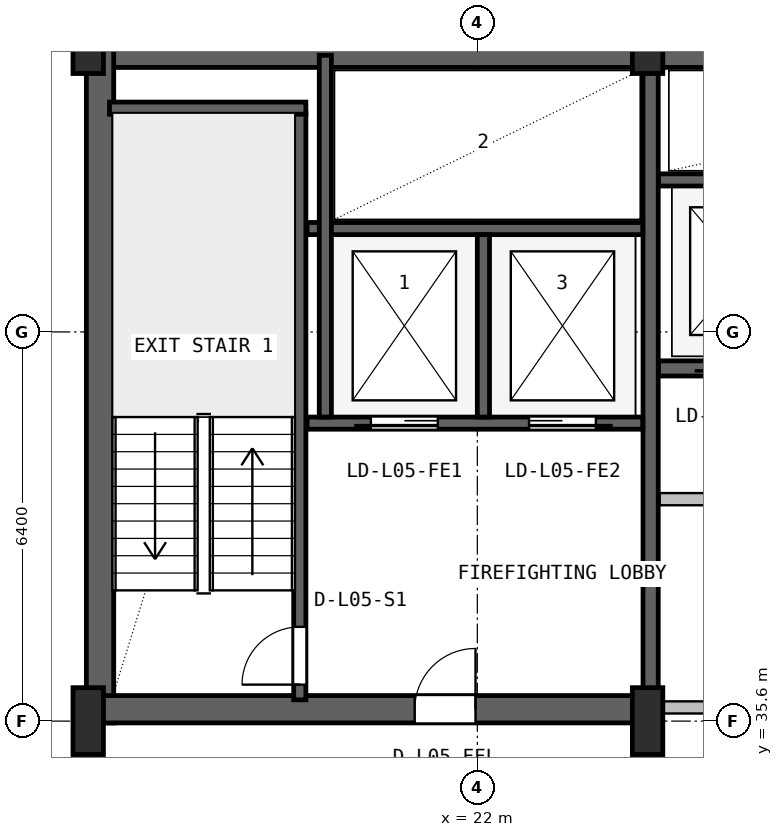
"""IFC4 building model, lengths in metres.
Left out: names, types, materials, properties, quantities, classifications, styles, units other than length and angle.
Written with IfcOpenShell. Run it as: python <this file> out.ifc"""

import sys

from ifc_helpers import new_model, si_unit, direction, frame, frame_2d, origin, origin_2d, place, context, subcontext, project, spatial, rectangle, i_section, extrude, source, transform, mapped, element, fill, save


model = new_model("IFC4")
c1 = context("Model", 3, precision=1e-05, world=origin(), true_north=direction((0.0, 1.0)))
c2 = subcontext(c1, "Body", "Model", "MODEL_VIEW")
j1 = project(units=[si_unit("LENGTHUNIT", "METRE"), si_unit("PLANEANGLEUNIT", "RADIAN")], contexts=[c1])
p1 = place(None, origin())
s1 = spatial("IfcSite", under=j1, at=p1, CompositionType="ELEMENT")
p2 = place(p1, origin())
s2 = spatial("IfcBuilding", under=s1, at=p2, CompositionType="ELEMENT")
p3 = place(p2, frame((0.0, 0.0, 27.6)))
s3 = spatial("IfcBuildingStorey", under=s2, at=p3, CompositionType="ELEMENT", Elevation=27.6)
p4 = place(p3, frame((15.6, 46.575, 0.0), z_axis=(0.0, 0.0, 1.0), x_axis=(1.0, 0.0, 0.0)))
e1 = element("IfcWall", 1, at=p4, inside=s3, PredefinedType="SHEAR", context=c2, shape_type="SweptSolid", body=[
    extrude(rectangle(XDim=36.8, YDim=0.45, at=frame_2d((18.4, 0.0))), origin(), (0.0, 0.0, 1.0), 3.65),
])
p5 = place(p3, frame((15.795, 35.57, 0.0), z_axis=(0.0, 0.0, 1.0), x_axis=(0.0, 1.0, 0.0)))
e2 = element("IfcWall", 2, at=p5, inside=s3, PredefinedType="SHEAR", context=c2, shape_type="SweptSolid", body=[
    extrude(rectangle(XDim=11.23, YDim=0.45, at=frame_2d((5.615, 0.0))), origin(), (0.0, 0.0, 1.0), 3.65),
])
p6 = place(p3, frame((15.57, 35.795, 0.0), z_axis=(0.0, 0.0, 1.0), x_axis=(1.0, 0.0, 0.0)))
e3 = element("IfcWall", 3, at=p6, inside=s3, PredefinedType="SHEAR", context=c2, shape_type="SweptSolid", body=[
    extrude(rectangle(XDim=9.23, YDim=0.45, at=frame_2d((4.615, 0.0))), origin(), (0.0, 0.0, 1.0), 3.65),
])
p7 = place(p6, frame((5.4, 0.0, 0.0)))
e4 = element("IfcOpeningElement", 4, at=p7, cuts=e3, PredefinedType="OPENING", context=c2, shape_type="SweptSolid", body=[
    extrude(rectangle(XDim=1.0, YDim=2.1, at=frame_2d((0.5, 1.05))), frame((0.0, 0.235, 0.0), z_axis=(0.0, -1.0, 0.0), x_axis=(1.0, 0.0, 0.0)), (0.0, 0.0, 1.0), 0.47),
])
m1 = source(origin(), c2, "Body", "SweptSolid", [
    extrude(i_section(OverallWidth=0.5, OverallDepth=1.1, WebThickness=0.018, FlangeThickness=0.032, FilletRadius=0.018, at=origin_2d()), origin(), (0.0, 0.0, 1.0), 3.9),
])
for number, where, z_axis, x_axis in (
    (5, (15.6, 35.6, 0.0), (0.0, 0.0, 1.0), (1.0, 0.0, 0.0)),
    (6, (15.6, 46.8, 0.0), (0.0, 0.0, 1.0), (1.0, 0.0, 0.0)),
    (7, (24.8, 35.6, 0.0), (0.0, 0.0, 1.0), (1.0, 0.0, 0.0)),
    (8, (24.8, 46.8, 0.0), (0.0, 0.0, 1.0), (1.0, 0.0, 0.0)),
):
    element("IfcColumn", number, at=place(p3, frame(where, z_axis=z_axis, x_axis=x_axis)), inside=s3, PredefinedType="COLUMN", context=c2, shape_type="MappedRepresentation", body=[
        mapped(m1, transform((0.0, 0.0, 0.0), x_axis=(1.0, 0.0, 0.0), y_axis=(0.0, 1.0, 0.0), z_axis=(0.0, 0.0, 1.0), scale=1.0)),
    ])
p8 = place(p3, frame((19.08, 35.95, 0.0), z_axis=(0.0, 0.0, 1.0), x_axis=(0.0, 1.0, 0.0)))
e9 = element("IfcWall", 9, at=p8, inside=s3, PredefinedType="SHEAR", context=c2, shape_type="SweptSolid", body=[
    extrude(rectangle(XDim=9.65, YDim=0.2, at=frame_2d((4.825, 0.0))), origin(), (0.0, 0.0, 1.0), 3.65),
])
p9 = place(p8, frame((0.25, 0.0, 0.0)))
e10 = element("IfcOpeningElement", 10, at=p9, cuts=e9, PredefinedType="OPENING", context=c2, shape_type="SweptSolid", body=[
    extrude(rectangle(XDim=0.95, YDim=2.1, at=frame_2d((0.475, 1.05))), frame((0.0, 0.11, 0.0), z_axis=(0.0, -1.0, 0.0), x_axis=(1.0, 0.0, 0.0)), (0.0, 0.0, 1.0), 0.22),
])
p10 = place(p3, frame((15.95, 45.68, 0.0), z_axis=(0.0, 0.0, 1.0), x_axis=(1.0, 0.0, 0.0)))
e11 = element("IfcWall", 11, at=p10, inside=s3, PredefinedType="SHEAR", context=c2, shape_type="SweptSolid", body=[
    extrude(rectangle(XDim=3.23, YDim=0.2, at=frame_2d((1.615, 0.0))), origin(), (0.0, 0.0, 1.0), 3.65),
])
p11 = place(p3, frame((24.85, 36.05, 0.0), z_axis=(0.0, 0.0, 1.0), x_axis=(0.0, 1.0, 0.0)))
e12 = element("IfcWall", 12, at=p11, inside=s3, PredefinedType="SHEAR", context=c2, shape_type="SweptSolid", body=[
    extrude(rectangle(XDim=10.45, YDim=0.25, at=frame_2d((5.225, 0.0))), origin(), (0.0, 0.0, 1.0), 3.65),
])
p12 = place(p3, frame((19.2, 40.5, 0.0), z_axis=(0.0, 0.0, 1.0), x_axis=(1.0, 0.0, 0.0)))
e13 = element("IfcWall", 13, at=p12, inside=s3, PredefinedType="SHEAR", context=c2, shape_type="SweptSolid", body=[
    extrude(rectangle(XDim=5.52, YDim=0.2, at=frame_2d((2.76, 0.0))), origin(), (0.0, 0.0, 1.0), 3.65),
])
p13 = place(p12, frame((1.05, 0.0, 0.0)))
e14 = element("IfcOpeningElement", 14, at=p13, cuts=e13, PredefinedType="OPENING", context=c2, shape_type="SweptSolid", body=[
    extrude(rectangle(XDim=1.1, YDim=2.18, at=frame_2d((0.55, 1.09))), frame((0.0, 0.11, 0.0), z_axis=(0.0, -1.0, 0.0), x_axis=(1.0, 0.0, 0.0)), (0.0, 0.0, 1.0), 0.22),
])
p14 = place(p12, frame((3.65, 0.0, 0.0)))
e15 = element("IfcOpeningElement", 15, at=p14, cuts=e13, PredefinedType="OPENING", context=c2, shape_type="SweptSolid", body=[
    extrude(rectangle(XDim=1.1, YDim=2.18, at=frame_2d((0.55, 1.09))), frame((0.0, 0.11, 0.0), z_axis=(0.0, -1.0, 0.0), x_axis=(1.0, 0.0, 0.0)), (0.0, 0.0, 1.0), 0.22),
])
p15 = place(p3, frame((19.2, 43.7, 0.0), z_axis=(0.0, 0.0, 1.0), x_axis=(1.0, 0.0, 0.0)))
e16 = element("IfcWall", 16, at=p15, inside=s3, PredefinedType="SHEAR", context=c2, shape_type="SweptSolid", body=[
    extrude(rectangle(XDim=5.52, YDim=0.2, at=frame_2d((2.76, 0.0))), origin(), (0.0, 0.0, 1.0), 3.65),
])
p16 = place(p3, frame((22.1, 40.6, 0.0), z_axis=(0.0, 0.0, 1.0), x_axis=(0.0, 1.0, 0.0)))
e17 = element("IfcWall", 17, at=p16, inside=s3, PredefinedType="SHEAR", context=c2, shape_type="SweptSolid", body=[
    extrude(rectangle(XDim=3.0, YDim=0.2, at=frame_2d((1.5, 0.0))), origin(), (0.0, 0.0, 1.0), 3.65),
])
p17 = place(p3, frame((19.5, 40.6, 0.0), z_axis=(0.0, 0.0, 1.0), x_axis=(0.0, 1.0, 0.0)))
e18 = element("IfcWall", 18, at=p17, inside=s3, PredefinedType="SHEAR", context=c2, shape_type="SweptSolid", body=[
    extrude(rectangle(XDim=5.95, YDim=0.2, at=frame_2d((2.975, 0.0))), origin(), (0.0, 0.0, 1.0), 3.65),
])
p18 = place(p3, frame((24.98, 41.4, 0.0), z_axis=(0.0, 0.0, 1.0), x_axis=(1.0, 0.0, 0.0)))
e19 = element("IfcWall", 19, at=p18, inside=s3, PredefinedType="SHEAR", context=c2, shape_type="SweptSolid", body=[
    extrude(rectangle(XDim=23.82, YDim=0.25, at=frame_2d((11.91, 0.0))), origin(), (0.0, 0.0, 1.0), 3.65),
])
p19 = place(p18, frame((0.87, 0.0, 0.0)))
e20 = element("IfcOpeningElement", 20, at=p19, cuts=e19, PredefinedType="OPENING", context=c2, shape_type="SweptSolid", body=[
    extrude(rectangle(XDim=1.1, YDim=2.18, at=frame_2d((0.55, 1.09))), frame((0.0, 0.135, 0.0), z_axis=(0.0, -1.0, 0.0), x_axis=(1.0, 0.0, 0.0)), (0.0, 0.0, 1.0), 0.27),
])
p20 = place(p18, frame((3.47, 0.0, 0.0)))
e21 = element("IfcOpeningElement", 21, at=p20, cuts=e19, PredefinedType="OPENING", context=c2, shape_type="SweptSolid", body=[
    extrude(rectangle(XDim=1.1, YDim=2.18, at=frame_2d((0.55, 1.09))), frame((0.0, 0.135, 0.0), z_axis=(0.0, -1.0, 0.0), x_axis=(1.0, 0.0, 0.0)), (0.0, 0.0, 1.0), 0.27),
])
p21 = place(p18, frame((6.07, 0.0, 0.0)))
e22 = element("IfcOpeningElement", 22, at=p21, cuts=e19, PredefinedType="OPENING", context=c2, shape_type="SweptSolid", body=[
    extrude(rectangle(XDim=1.1, YDim=2.18, at=frame_2d((0.55, 1.09))), frame((0.0, 0.135, 0.0), z_axis=(0.0, -1.0, 0.0), x_axis=(1.0, 0.0, 0.0)), (0.0, 0.0, 1.0), 0.27),
])
p22 = place(p3, frame((24.98, 44.5, 0.0), z_axis=(0.0, 0.0, 1.0), x_axis=(1.0, 0.0, 0.0)))
e23 = element("IfcWall", 23, at=p22, inside=s3, PredefinedType="SHEAR", context=c2, shape_type="SweptSolid", body=[
    extrude(rectangle(XDim=7.87, YDim=0.2, at=frame_2d((3.935, 0.0))), origin(), (0.0, 0.0, 1.0), 3.65),
])
p23 = place(p3, frame((25.0, 35.825, 0.0), z_axis=(0.0, 0.0, 1.0), x_axis=(1.0, 0.0, 0.0)))
e24 = element("IfcWall", 24, at=p23, inside=s3, PredefinedType="SOLIDWALL", context=c2, shape_type="SweptSolid", body=[
    extrude(rectangle(XDim=12.95, YDim=0.2, at=frame_2d((6.475, 0.0))), origin(), (0.0, 0.0, 1.0), 2.425),
])
p24 = place(p3, frame((25.0, 39.25, 0.0), z_axis=(0.0, 0.0, 1.0), x_axis=(1.0, 0.0, 0.0)))
e25 = element("IfcWall", 25, at=p24, inside=s3, PredefinedType="SOLIDWALL", context=c2, shape_type="SweptSolid", body=[
    extrude(rectangle(XDim=12.95, YDim=0.2, at=frame_2d((6.475, 0.0))), origin(), (0.0, 0.0, 1.0), 3.63),
])
p25 = place(p24, frame((1.1, 0.0, 0.0)))
e26 = element("IfcOpeningElement", 26, at=p25, cuts=e25, PredefinedType="OPENING", context=c2, shape_type="SweptSolid", body=[
    extrude(rectangle(XDim=0.9, YDim=2.06, at=frame_2d((0.45, 1.03))), frame((0.0, 0.11, 0.0), z_axis=(0.0, -1.0, 0.0), x_axis=(1.0, 0.0, 0.0)), (0.0, 0.0, 1.0), 0.22),
])
p26 = place(p24, frame((4.5, 0.0, 0.0)))
e27 = element("IfcOpeningElement", 27, at=p26, cuts=e25, PredefinedType="OPENING", context=c2, shape_type="SweptSolid", body=[
    extrude(rectangle(XDim=0.9, YDim=2.06, at=frame_2d((0.45, 1.03))), frame((0.0, 0.11, 0.0), z_axis=(0.0, -1.0, 0.0), x_axis=(1.0, 0.0, 0.0)), (0.0, 0.0, 1.0), 0.22),
])
p27 = place(p24, frame((7.84, 0.0, 0.0)))
e28 = element("IfcOpeningElement", 28, at=p27, cuts=e25, PredefinedType="OPENING", context=c2, shape_type="SweptSolid", body=[
    extrude(rectangle(XDim=0.92, YDim=2.08, at=frame_2d((0.46, 1.04))), frame((0.0, 0.11, 0.0), z_axis=(0.0, -1.0, 0.0), x_axis=(1.0, 0.0, 0.0)), (0.0, 0.0, 1.0), 0.22),
])
p28 = place(p24, frame((10.875, 0.0, 0.0)))
e29 = element("IfcOpeningElement", 29, at=p28, cuts=e25, PredefinedType="OPENING", context=c2, shape_type="SweptSolid", body=[
    extrude(rectangle(XDim=1.2, YDim=2.1, at=frame_2d((0.6, 1.05))), frame((0.0, 0.11, 0.0), z_axis=(0.0, -1.0, 0.0), x_axis=(1.0, 0.0, 0.0)), (0.0, 0.0, 1.0), 0.22),
])
m2 = source(origin(), c2, "Body", "SweptSolid", [
    extrude(rectangle(XDim=0.95, YDim=2.1, at=frame_2d((0.475, 1.05))), frame((0.0, 0.025, 0.0), z_axis=(0.0, -1.0, 0.0), x_axis=(1.0, 0.0, 0.0)), (0.0, 0.0, 1.0), 0.05),
])
p29 = place(p9, origin())
e30 = element("IfcDoor", 30, at=p29, inside=s3, OperationType="SINGLE_SWING_LEFT", PredefinedType="DOOR", context=c2, shape_type="MappedRepresentation", body=[
    mapped(m2, transform((0.0, 0.0, 0.0), x_axis=(1.0, 0.0, 0.0), y_axis=(0.0, 1.0, 0.0), z_axis=(0.0, 0.0, 1.0), scale=1.0)),
])
fill(e10, e30)
m3 = source(origin(), c2, "Body", "SweptSolid", [
    extrude(rectangle(XDim=1.0, YDim=2.1, at=frame_2d((0.5, 1.05))), frame((0.0, 0.025, 0.0), z_axis=(0.0, -1.0, 0.0), x_axis=(1.0, 0.0, 0.0)), (0.0, 0.0, 1.0), 0.05),
])
p30 = place(p7, origin())
e31 = element("IfcDoor", 31, at=p30, inside=s3, OperationType="SINGLE_SWING_RIGHT", PredefinedType="DOOR", context=c2, shape_type="MappedRepresentation", body=[
    mapped(m3, transform((0.0, 0.0, 0.0), x_axis=(1.0, 0.0, 0.0), y_axis=(0.0, 1.0, 0.0), z_axis=(0.0, 0.0, 1.0), scale=1.0)),
])
fill(e4, e31)
m4 = source(origin(), c2, "Body", "SweptSolid", [
    extrude(rectangle(XDim=1.1, YDim=2.18, at=frame_2d((0.55, 1.09))), frame((0.0, 0.025, 0.0), z_axis=(0.0, -1.0, 0.0), x_axis=(1.0, 0.0, 0.0)), (0.0, 0.0, 1.0), 0.05),
])
p31 = place(p13, frame((1.1, 0.0, 0.0), z_axis=(0.0, 0.0, 1.0), x_axis=(-1.0, 0.0, 0.0)))
e32 = element("IfcDoor", 32, at=p31, inside=s3, OperationType="SLIDING_TO_LEFT", PredefinedType="DOOR", context=c2, shape_type="MappedRepresentation", body=[
    mapped(m4, transform((0.0, 0.0, 0.0), x_axis=(1.0, 0.0, 0.0), y_axis=(0.0, 1.0, 0.0), z_axis=(0.0, 0.0, 1.0), scale=1.0)),
])
fill(e14, e32)
p32 = place(p14, frame((1.1, 0.0, 0.0), z_axis=(0.0, 0.0, 1.0), x_axis=(-1.0, 0.0, 0.0)))
e33 = element("IfcDoor", 33, at=p32, inside=s3, OperationType="SLIDING_TO_RIGHT", PredefinedType="DOOR", context=c2, shape_type="MappedRepresentation", body=[
    mapped(m4, transform((0.0, 0.0, 0.0), x_axis=(1.0, 0.0, 0.0), y_axis=(0.0, 1.0, 0.0), z_axis=(0.0, 0.0, 1.0), scale=1.0)),
])
fill(e15, e33)
save(model, sys.argv[1])
